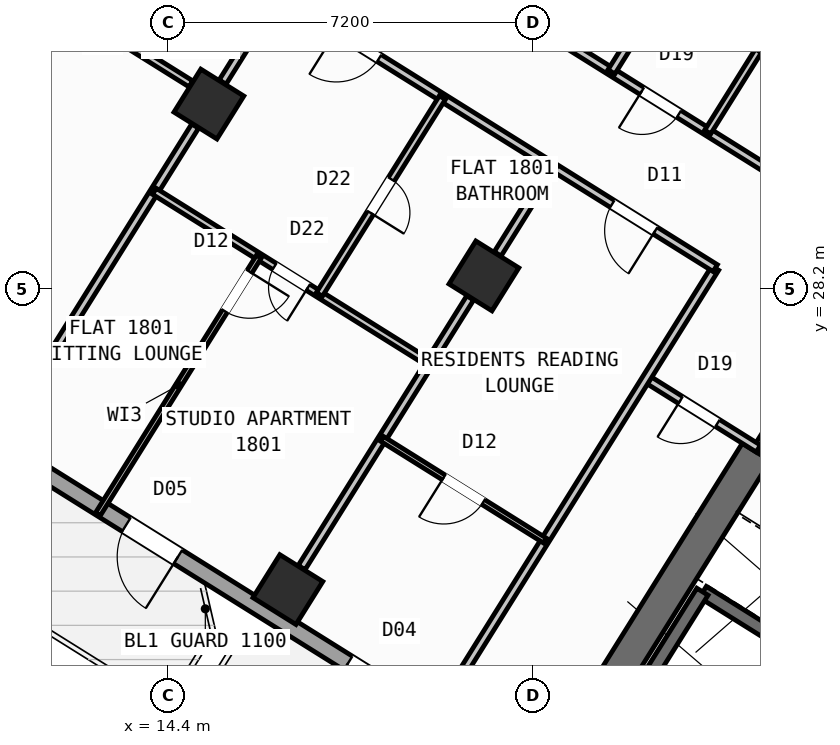
"""IFC4 building model, lengths in metres.
Left out: names, types, materials, properties, quantities, classifications, styles, units other than length and angle.
Written with IfcOpenShell. Run it as: python <this file> out.ifc"""

import sys

from ifc_helpers import new_model, si_unit, direction, frame, frame_2d, origin, origin_2d, place, context, subcontext, project, spatial, rectangle, hollow_rectangle, extrude, source, transform, mapped, element, fill, save


model = new_model("IFC4")
c1 = context("Model", 3, precision=1e-05, world=origin(), true_north=direction((0.0, 1.0)))
c2 = subcontext(c1, "Body", "Model", "MODEL_VIEW")
j1 = project(units=[si_unit("LENGTHUNIT", "METRE"), si_unit("PLANEANGLEUNIT", "RADIAN")], contexts=[c1])
p1 = place(None, origin())
s1 = spatial("IfcSite", under=j1, at=p1, CompositionType="ELEMENT")
p2 = place(p1, origin())
s2 = spatial("IfcBuilding", under=s1, at=p2, CompositionType="ELEMENT")
p3 = place(p2, frame((0.0, 0.0, 71.7)))
s3 = spatial("IfcBuildingStorey", under=s2, at=p3, CompositionType="ELEMENT", Elevation=71.7)
p4 = place(p3, frame((26.007, 24.976, 0.0), z_axis=(0.0, 0.0, 1.0), x_axis=(-0.529916319127, -0.848049936456, 0.0)))
e1 = element("IfcWall", 1, at=p4, inside=s3, PredefinedType="SHEAR", context=c2, shape_type="SweptSolid", body=[
    extrude(rectangle(XDim=6.375, YDim=0.65, at=frame_2d((3.188, 0.0))), origin(), (0.0, 0.0, 1.0), 4.52),
])
m1 = source(origin(), c2, "Body", "SweptSolid", [
    extrude(hollow_rectangle(XDim=1.0, YDim=1.0, WallThickness=0.04, at=origin_2d()), origin(), (0.0, 0.0, 1.0), 4.8),
])
for number, where, z_axis, x_axis in (
    (2, (20.632, 28.452, 0.0), (0.0, 0.0, 1.0), (-0.848, 0.53, 0.0)),
    (3, (16.764, 22.261, 0.0), (0.0, 0.0, 1.0), (-0.848, 0.53, 0.0)),
    (4, (15.205, 31.844, 0.0), (0.0, 0.0, 1.0), (-0.848, 0.53, 0.0)),
):
    element("IfcColumn", number, at=place(p3, frame(where, z_axis=z_axis, x_axis=x_axis)), inside=s3, PredefinedType="COLUMN", context=c2, shape_type="MappedRepresentation", body=[
        mapped(m1, transform((0.0, 0.0, 0.0), scale=1.0)),
    ])
p5 = place(p3, frame((31.76, 12.183, 0.0), z_axis=(0.0, 0.0, 1.0), x_axis=(-0.848047074256, 0.529920899612, 0.0)))
e5 = element("IfcWall", 5, at=p5, inside=s3, PredefinedType="STANDARD", context=c2, shape_type="SweptSolid", body=[
    extrude(rectangle(XDim=30.652, YDim=0.32, at=frame_2d((15.326, 0.0))), origin(), (0.0, 0.0, 1.0), 4.52),
])
p6 = place(p5, frame((20.241, 0.0, 0.0)))
e6 = element("IfcOpeningElement", 6, at=p6, cuts=e5, PredefinedType="OPENING", context=c2, shape_type="SweptSolid", body=[
    extrude(rectangle(XDim=1.2, YDim=2.15, at=frame_2d((0.6, 1.075))), frame((0.0, 0.17, 0.0), z_axis=(0.0, -1.0, 0.0), x_axis=(1.0, 0.0, 0.0)), (0.0, 0.0, 1.0), 0.34),
])
p7 = place(p5, frame((14.781, 0.0, 0.0)))
e7 = element("IfcOpeningElement", 7, at=p7, cuts=e5, PredefinedType="OPENING", context=c2, shape_type="SweptSolid", body=[
    extrude(rectangle(XDim=1.5, YDim=2.25, at=frame_2d((0.75, 1.125))), frame((0.0, 0.17, 0.0), z_axis=(0.0, -1.0, 0.0), x_axis=(1.0, 0.0, 0.0)), (0.0, 0.0, 1.0), 0.34),
])
p8 = place(p5, frame((1.84, 0.0, 0.75)))
e8 = element("IfcOpeningElement", 8, at=p8, cuts=e5, PredefinedType="OPENING", context=c2, shape_type="SweptSolid", body=[
    extrude(rectangle(XDim=2.4, YDim=1.6, at=frame_2d((1.2, 0.8))), frame((0.0, 0.17, 0.0), z_axis=(0.0, -1.0, 0.0), x_axis=(1.0, 0.0, 0.0)), (0.0, 0.0, 1.0), 0.34),
])
p9 = place(p5, frame((7.019, 0.0, 0.75)))
e9 = element("IfcOpeningElement", 9, at=p9, cuts=e5, PredefinedType="OPENING", context=c2, shape_type="SweptSolid", body=[
    extrude(rectangle(XDim=2.4, YDim=1.6, at=frame_2d((1.2, 0.8))), frame((0.0, 0.17, 0.0), z_axis=(0.0, -1.0, 0.0), x_axis=(1.0, 0.0, 0.0)), (0.0, 0.0, 1.0), 0.34),
])
p10 = place(p5, frame((25.841, 0.0, 0.95)))
e10 = element("IfcOpeningElement", 10, at=p10, cuts=e5, PredefinedType="OPENING", context=c2, shape_type="SweptSolid", body=[
    extrude(rectangle(XDim=1.2, YDim=1.4, at=frame_2d((0.6, 0.7))), frame((0.0, 0.17, 0.0), z_axis=(0.0, -1.0, 0.0), x_axis=(1.0, 0.0, 0.0)), (0.0, 0.0, 1.0), 0.34),
])
p11 = place(p3, frame((5.7, 28.71, 0.0), z_axis=(0.0, 0.0, 1.0), x_axis=(0.529923711467, 0.8480453172, 0.0)))
e11 = element("IfcWall", 11, at=p11, inside=s3, PredefinedType="STANDARD", context=c2, shape_type="SweptSolid", body=[
    extrude(rectangle(XDim=21.587, YDim=0.32, at=frame_2d((10.794, 0.0))), origin(), (0.0, 0.0, 1.0), 3.895),
])
p12 = place(p11, frame((2.844, 0.0, 0.75)))
e12 = element("IfcOpeningElement", 12, at=p12, cuts=e11, PredefinedType="OPENING", context=c2, shape_type="SweptSolid", body=[
    extrude(rectangle(XDim=2.4, YDim=1.6, at=frame_2d((1.2, 0.8))), frame((0.0, 0.17, 0.0), z_axis=(0.0, -1.0, 0.0), x_axis=(1.0, 0.0, 0.0)), (0.0, 0.0, 1.0), 0.34),
])
p13 = place(p3, frame((17.424, 47.083, 0.0), z_axis=(0.0, 0.0, 1.0), x_axis=(0.848049927979, -0.529916332693, 0.0)))
e13 = element("IfcWall", 13, at=p13, inside=s3, PredefinedType="STANDARD", context=c2, shape_type="SweptSolid", body=[
    extrude(rectangle(XDim=29.223, YDim=0.32, at=frame_2d((14.612, 0.0))), origin(), (0.0, 0.0, 1.0), 4.52),
])
p14 = place(p13, frame((3.339, 0.0, 0.0)))
e14 = element("IfcOpeningElement", 14, at=p14, cuts=e13, PredefinedType="OPENING", context=c2, shape_type="SweptSolid", body=[
    extrude(rectangle(XDim=1.05, YDim=2.15, at=frame_2d((0.525, 1.075))), frame((0.0, 0.17, 0.0), z_axis=(0.0, -1.0, 0.0), x_axis=(1.0, 0.0, 0.0)), (0.0, 0.0, 1.0), 0.34),
])
p15 = place(p13, frame((8.194, 0.0, 0.75)))
e15 = element("IfcOpeningElement", 15, at=p15, cuts=e13, PredefinedType="OPENING", context=c2, shape_type="SweptSolid", body=[
    extrude(rectangle(XDim=2.4, YDim=1.6, at=frame_2d((1.2, 0.8))), frame((0.0, 0.17, 0.0), z_axis=(0.0, -1.0, 0.0), x_axis=(1.0, 0.0, 0.0)), (0.0, 0.0, 1.0), 0.34),
])
p16 = place(p13, frame((22.226, 0.0, 0.85)))
e16 = element("IfcOpeningElement", 16, at=p16, cuts=e13, PredefinedType="OPENING", context=c2, shape_type="SweptSolid", body=[
    extrude(rectangle(XDim=1.8, YDim=1.5, at=frame_2d((0.9, 0.75))), frame((0.0, 0.17, 0.0), z_axis=(0.0, -1.0, 0.0), x_axis=(1.0, 0.0, 0.0)), (0.0, 0.0, 1.0), 0.34),
])
p17 = place(p13, frame((26.934, 0.0, 0.95)))
e17 = element("IfcOpeningElement", 17, at=p17, cuts=e13, PredefinedType="OPENING", context=c2, shape_type="SweptSolid", body=[
    extrude(rectangle(XDim=1.2, YDim=1.4, at=frame_2d((0.6, 0.7))), frame((0.0, 0.17, 0.0), z_axis=(0.0, -1.0, 0.0), x_axis=(1.0, 0.0, 0.0)), (0.0, 0.0, 1.0), 0.34),
])
p18 = place(p13, frame((14.636, 0.0, 1.0)))
e18 = element("IfcOpeningElement", 18, at=p18, cuts=e13, PredefinedType="OPENING", context=c2, shape_type="SweptSolid", body=[
    extrude(rectangle(XDim=0.9, YDim=1.25, at=frame_2d((0.45, 0.625))), frame((0.0, 0.17, 0.0), z_axis=(0.0, -1.0, 0.0), x_axis=(1.0, 0.0, 0.0)), (0.0, 0.0, 1.0), 0.34),
])
p19 = place(p3, frame((31.28, 18.261, 0.0), z_axis=(0.0, 0.0, 1.0), x_axis=(-0.848051618787, 0.529913626805, 0.0)))
e19 = element("IfcWall", 19, at=p19, inside=s3, PredefinedType="SHEAR", context=c2, shape_type="SweptSolid", body=[
    extrude(rectangle(XDim=7.46, YDim=0.26, at=frame_2d((3.73, 0.0))), origin(), (0.0, 0.0, 1.0), 4.52),
])
p20 = place(p19, frame((0.36, 0.0, 0.0)))
e20 = element("IfcOpeningElement", 20, at=p20, cuts=e19, PredefinedType="OPENING", context=c2, shape_type="SweptSolid", body=[
    extrude(rectangle(XDim=0.86, YDim=2.05, at=frame_2d((0.43, 1.025))), frame((0.0, 0.14, 0.0), z_axis=(0.0, -1.0, 0.0), x_axis=(1.0, 0.0, 0.0)), (0.0, 0.0, 1.0), 0.28),
])
p21 = place(p3, frame((24.945, 22.22, 0.0), z_axis=(0.0, 0.0, 1.0), x_axis=(-0.529908658664, -0.84805472316, 0.0)))
e21 = element("IfcWall", 21, at=p21, inside=s3, PredefinedType="SHEAR", context=c2, shape_type="SweptSolid", body=[
    extrude(rectangle(XDim=3.16, YDim=0.26, at=frame_2d((1.58, 0.0))), origin(), (0.0, 0.0, 1.0), 4.52),
])
p22 = place(p3, frame((27.596, 27.52, 0.0), z_axis=(0.0, 0.0, 1.0), x_axis=(-0.529865479138, -0.848081702443, 0.0)))
e22 = element("IfcWall", 22, at=p22, inside=s3, PredefinedType="STANDARD", context=c2, shape_type="SweptSolid", body=[
    extrude(rectangle(XDim=2.96, YDim=0.2, at=frame_2d((1.48, 0.0))), origin(), (0.0, 0.0, 1.0), 4.51),
])
p23 = place(p22, frame((1.76, 0.0, 0.0)))
e23 = element("IfcOpeningElement", 23, at=p23, cuts=e22, PredefinedType="OPENING", context=c2, shape_type="SweptSolid", body=[
    extrude(rectangle(XDim=0.86, YDim=2.05, at=frame_2d((0.43, 1.025))), frame((0.0, 0.11, 0.0), z_axis=(0.0, -1.0, 0.0), x_axis=(1.0, 0.0, 0.0)), (0.0, 0.0, 1.0), 0.22),
])
p24 = place(p3, frame((26.049, 25.044, 0.0), z_axis=(0.0, 0.0, 1.0), x_axis=(-0.848050851465, 0.529914854792, 0.0)))
e24 = element("IfcWall", 24, at=p24, inside=s3, PredefinedType="PARTITIONING", context=c2, shape_type="SweptSolid", body=[
    extrude(rectangle(XDim=2.61, YDim=0.16, at=frame_2d((1.305, 0.0))), origin(), (0.0, 0.0, 1.0), 3.895),
])
p25 = place(p24, frame((0.95, 0.0, 0.0)))
e25 = element("IfcOpeningElement", 25, at=p25, cuts=e24, PredefinedType="OPENING", context=c2, shape_type="SweptSolid", body=[
    extrude(rectangle(XDim=0.86, YDim=2.05, at=frame_2d((0.43, 1.025))), frame((0.0, 0.09, 0.0), z_axis=(0.0, -1.0, 0.0), x_axis=(1.0, 0.0, 0.0)), (0.0, 0.0, 1.0), 0.18),
])
p26 = place(p3, frame((25.198, 28.606, 0.0), z_axis=(0.0, 0.0, 1.0), x_axis=(-0.529926497642, -0.848043576178, 0.0)))
e26 = element("IfcWall", 26, at=p26, inside=s3, PredefinedType="PARTITIONING", context=c2, shape_type="SweptSolid", body=[
    extrude(rectangle(XDim=10.3, YDim=0.16, at=frame_2d((5.15, 0.0))), origin(), (0.0, 0.0, 1.0), 4.51),
])
p27 = place(p3, frame((26.363, 30.472, 0.0), z_axis=(0.0, 0.0, 1.0), x_axis=(-0.848052408131, 0.529912363569, 0.0)))
e27 = element("IfcWall", 27, at=p27, inside=s3, PredefinedType="PARTITIONING", context=c2, shape_type="SweptSolid", body=[
    extrude(rectangle(XDim=16.73, YDim=0.16, at=frame_2d((8.365, 0.0))), origin(), (0.0, 0.0, 1.0), 4.51),
])
p28 = place(p27, frame((2.22, 0.0, 0.0)))
e28 = element("IfcOpeningElement", 28, at=p28, cuts=e27, PredefinedType="OPENING", context=c2, shape_type="SweptSolid", body=[
    extrude(rectangle(XDim=0.86, YDim=2.05, at=frame_2d((0.43, 1.025))), frame((0.0, 0.09, 0.0), z_axis=(0.0, -1.0, 0.0), x_axis=(1.0, 0.0, 0.0)), (0.0, 0.0, 1.0), 0.18),
])
p29 = place(p27, frame((7.82, 0.0, 0.0)))
e29 = element("IfcOpeningElement", 29, at=p29, cuts=e27, PredefinedType="OPENING", context=c2, shape_type="SweptSolid", body=[
    extrude(rectangle(XDim=1.0, YDim=2.1, at=frame_2d((0.5, 1.05))), frame((0.0, 0.09, 0.0), z_axis=(0.0, -1.0, 0.0), x_axis=(1.0, 0.0, 0.0)), (0.0, 0.0, 1.0), 0.18),
])
p30 = place(p27, frame((12.95, 0.0, 0.0)))
e30 = element("IfcOpeningElement", 30, at=p30, cuts=e27, PredefinedType="OPENING", context=c2, shape_type="SweptSolid", body=[
    extrude(rectangle(XDim=1.0, YDim=2.1, at=frame_2d((0.5, 1.05))), frame((0.0, 0.09, 0.0), z_axis=(0.0, -1.0, 0.0), x_axis=(1.0, 0.0, 0.0)), (0.0, 0.0, 1.0), 0.18),
])
p31 = place(p3, frame((25.198, 28.606, 0.0), z_axis=(0.0, 0.0, 1.0), x_axis=(-0.848052408131, 0.529912363569, 0.0)))
e31 = element("IfcWall", 31, at=p31, inside=s3, PredefinedType="PARTITIONING", context=c2, shape_type="SweptSolid", body=[
    extrude(rectangle(XDim=16.73, YDim=0.16, at=frame_2d((8.365, 0.0))), origin(), (0.0, 0.0, 1.0), 4.51),
])
p32 = place(p31, frame((1.395, 0.0, 0.0)))
e32 = element("IfcOpeningElement", 32, at=p32, cuts=e31, PredefinedType="OPENING", context=c2, shape_type="SweptSolid", body=[
    extrude(rectangle(XDim=1.0, YDim=2.1, at=frame_2d((0.5, 1.05))), frame((0.0, 0.09, 0.0), z_axis=(0.0, -1.0, 0.0), x_axis=(1.0, 0.0, 0.0)), (0.0, 0.0, 1.0), 0.18),
])
p33 = place(p31, frame((7.82, 0.0, 0.0)))
e33 = element("IfcOpeningElement", 33, at=p33, cuts=e31, PredefinedType="OPENING", context=c2, shape_type="SweptSolid", body=[
    extrude(rectangle(XDim=1.0, YDim=2.1, at=frame_2d((0.5, 1.05))), frame((0.0, 0.09, 0.0), z_axis=(0.0, -1.0, 0.0), x_axis=(1.0, 0.0, 0.0)), (0.0, 0.0, 1.0), 0.18),
])
p34 = place(p31, frame((14.76, 0.0, 0.0)))
e34 = element("IfcOpeningElement", 34, at=p34, cuts=e31, PredefinedType="OPENING", context=c2, shape_type="SweptSolid", body=[
    extrude(rectangle(XDim=1.0, YDim=2.1, at=frame_2d((0.5, 1.05))), frame((0.0, 0.09, 0.0), z_axis=(0.0, -1.0, 0.0), x_axis=(1.0, 0.0, 0.0)), (0.0, 0.0, 1.0), 0.18),
])
p35 = place(p3, frame((21.983, 30.615, 0.0), z_axis=(0.0, 0.0, 1.0), x_axis=(-0.529966635742, -0.848018493313, 0.0)))
e35 = element("IfcWall", 35, at=p35, inside=s3, PredefinedType="PARTITIONING", context=c2, shape_type="SweptSolid", body=[
    extrude(rectangle(XDim=2.038, YDim=0.16, at=frame_2d((1.019, 0.0))), origin(), (0.0, 0.0, 1.0), 3.895),
])
p36 = place(p3, frame((20.361, 28.018, 0.0), z_axis=(0.0, 0.0, 1.0), x_axis=(-0.529915015264, -0.848050751193, 0.0)))
e36 = element("IfcWall", 36, at=p36, inside=s3, PredefinedType="PARTITIONING", context=c2, shape_type="SweptSolid", body=[
    extrude(rectangle(XDim=6.276, YDim=0.16, at=frame_2d((3.138, 0.0))), origin(), (0.0, 0.0, 1.0), 3.895),
])
p37 = place(p3, frame((21.837, 23.228, 0.0), z_axis=(0.0, 0.0, 1.0), x_axis=(-0.84803087207, 0.529946827537, 0.0)))
e37 = element("IfcWall", 37, at=p37, inside=s3, PredefinedType="PARTITIONING", context=c2, shape_type="SweptSolid", body=[
    extrude(rectangle(XDim=3.79, YDim=0.11, at=frame_2d((1.895, 0.0))), origin(), (0.0, 0.0, 1.0), 4.51),
])
p38 = place(p37, frame((1.435, 0.0, 0.0)))
e38 = element("IfcOpeningElement", 38, at=p38, cuts=e37, PredefinedType="OPENING", context=c2, shape_type="SweptSolid", body=[
    extrude(rectangle(XDim=0.92, YDim=2.08, at=frame_2d((0.46, 1.04))), frame((0.0, 0.065, 0.0), z_axis=(0.0, -1.0, 0.0), x_axis=(1.0, 0.0, 0.0)), (0.0, 0.0, 1.0), 0.13),
])
p39 = place(p3, frame((16.556, 34.006, 0.0), z_axis=(0.0, 0.0, 1.0), x_axis=(-0.529966635742, -0.848018493313, 0.0)))
e39 = element("IfcWall", 39, at=p39, inside=s3, PredefinedType="PARTITIONING", context=c2, shape_type="SweptSolid", body=[
    extrude(rectangle(XDim=2.038, YDim=0.16, at=frame_2d((1.019, 0.0))), origin(), (0.0, 0.0, 1.0), 3.895),
])
p40 = place(p3, frame((14.933, 31.409, 0.0), z_axis=(0.0, 0.0, 1.0), x_axis=(-0.529897533635, -0.848061674554, 0.0)))
e40 = element("IfcWall", 40, at=p40, inside=s3, PredefinedType="PARTITIONING", context=c2, shape_type="SweptSolid", body=[
    extrude(rectangle(XDim=6.276, YDim=0.16, at=frame_2d((3.138, 0.0))), origin(), (0.0, 0.0, 1.0), 3.895),
])
p41 = place(p3, frame((19.556, 26.73, 0.0), z_axis=(0.0, 0.0, 1.0), x_axis=(-0.848049732085, 0.529916646191, 0.0)))
e41 = element("IfcWall", 41, at=p41, inside=s3, PredefinedType="PLUMBINGWALL", context=c2, shape_type="SweptSolid", body=[
    extrude(rectangle(XDim=6.4, YDim=0.14, at=frame_2d((3.2, 0.0))), origin(), (0.0, 0.0, 1.0), 4.51),
])
p42 = place(p41, frame((2.824, 0.0, 0.0)))
e42 = element("IfcOpeningElement", 42, at=p42, cuts=e41, PredefinedType="OPENING", context=c2, shape_type="SweptSolid", body=[
    extrude(rectangle(XDim=0.78, YDim=2.05, at=frame_2d((0.39, 1.025))), frame((0.0, 0.08, 0.0), z_axis=(0.0, -1.0, 0.0), x_axis=(1.0, 0.0, 0.0)), (0.0, 0.0, 1.0), 0.16),
])
p43 = place(p3, frame((19.812, 31.971, 0.0), z_axis=(0.0, 0.0, 1.0), x_axis=(-0.529917480809, -0.848049210561, 0.0)))
e43 = element("IfcWall", 43, at=p43, inside=s3, PredefinedType="PLUMBINGWALL", context=c2, shape_type="SweptSolid", body=[
    extrude(rectangle(XDim=4.58, YDim=0.14, at=frame_2d((2.29, 0.0))), origin(), (0.0, 0.0, 1.0), 4.51),
])
p44 = place(p43, frame((1.9, 0.0, 0.0)))
e44 = element("IfcOpeningElement", 44, at=p44, cuts=e43, PredefinedType="OPENING", context=c2, shape_type="SweptSolid", body=[
    extrude(rectangle(XDim=0.78, YDim=2.05, at=frame_2d((0.39, 1.025))), frame((0.0, 0.08, 0.0), z_axis=(0.0, -1.0, 0.0), x_axis=(1.0, 0.0, 0.0)), (0.0, 0.0, 1.0), 0.16),
])
p45 = place(p3, frame((16.191, 28.833, 0.0), z_axis=(0.0, 0.0, 1.0), x_axis=(-0.529900017123, -0.848060122782, 0.0)))
e45 = element("IfcWall", 45, at=p45, inside=s3, PredefinedType="PARTITIONING", context=c2, shape_type="SweptSolid", body=[
    extrude(rectangle(XDim=5.99, YDim=0.11, at=frame_2d((2.995, 0.0))), origin(), (0.0, 0.0, 1.0), 4.51),
])
p46 = place(p45, frame((0.35, 0.0, 0.0)))
e46 = element("IfcOpeningElement", 46, at=p46, cuts=e45, PredefinedType="OPENING", context=c2, shape_type="SweptSolid", body=[
    extrude(rectangle(XDim=0.92, YDim=2.08, at=frame_2d((0.46, 1.04))), frame((0.0, 0.065, 0.0), z_axis=(0.0, -1.0, 0.0), x_axis=(1.0, 0.0, 0.0)), (0.0, 0.0, 1.0), 0.13),
])
p47 = place(p3, frame((13.486, 35.924, 0.0), z_axis=(0.0, 0.0, 1.0), x_axis=(-0.529924195719, -0.848045014602, 0.0)))
e47 = element("IfcWall", 47, at=p47, inside=s3, PredefinedType="PARTITIONING", context=c2, shape_type="SweptSolid", body=[
    extrude(rectangle(XDim=10.57, YDim=0.11, at=frame_2d((5.285, 0.0))), origin(), (0.0, 0.0, 1.0), 4.51),
])
p48 = place(p47, frame((0.76, 0.0, 0.0)))
e48 = element("IfcOpeningElement", 48, at=p48, cuts=e47, PredefinedType="OPENING", context=c2, shape_type="SweptSolid", body=[
    extrude(rectangle(XDim=0.78, YDim=2.05, at=frame_2d((0.39, 1.025))), frame((0.0, 0.065, 0.0), z_axis=(0.0, -1.0, 0.0), x_axis=(1.0, 0.0, 0.0)), (0.0, 0.0, 1.0), 0.13),
])
p49 = place(p47, frame((6.025, 0.0, 0.0)))
e49 = element("IfcOpeningElement", 49, at=p49, cuts=e47, PredefinedType="OPENING", context=c2, shape_type="SweptSolid", body=[
    extrude(rectangle(XDim=0.92, YDim=2.08, at=frame_2d((0.46, 1.04))), frame((0.0, 0.065, 0.0), z_axis=(0.0, -1.0, 0.0), x_axis=(1.0, 0.0, 0.0)), (0.0, 0.0, 1.0), 0.13),
])
p50 = place(p3, frame((14.85, 32.242, 0.0), z_axis=(0.0, 0.0, 1.0), x_axis=(-0.848051256418, 0.529914206724, 0.0)))
e50 = element("IfcWall", 50, at=p50, inside=s3, PredefinedType="PLUMBINGWALL", context=c2, shape_type="SweptSolid", body=[
    extrude(rectangle(XDim=3.108, YDim=0.14, at=frame_2d((1.554, 0.0))), origin(), (0.0, 0.0, 1.0), 3.895),
])
p51 = place(p3, frame((24.229, 34.209, 0.0), z_axis=(0.0, 0.0, 1.0), x_axis=(-0.529826648289, -0.84810596199, 0.0)))
e51 = element("IfcWall", 51, at=p51, inside=s3, PredefinedType="PARTITIONING", context=c2, shape_type="SweptSolid", body=[
    extrude(rectangle(XDim=2.038, YDim=0.16, at=frame_2d((1.019, 0.0))), origin(), (0.0, 0.0, 1.0), 3.895),
])
p52 = place(p3, frame((27.439, 35.118, 0.0), z_axis=(0.0, 0.0, 1.0), x_axis=(-0.529911350634, -0.84805304107, 0.0)))
e52 = element("IfcWall", 52, at=p52, inside=s3, PredefinedType="PLUMBINGWALL", context=c2, shape_type="SweptSolid", body=[
    extrude(rectangle(XDim=4.51, YDim=0.14, at=frame_2d((2.255, 0.0))), origin(), (0.0, 0.0, 1.0), 4.135),
])
p53 = place(p52, frame((1.865, 0.0, 0.0)))
e53 = element("IfcOpeningElement", 53, at=p53, cuts=e52, PredefinedType="OPENING", context=c2, shape_type="SweptSolid", body=[
    extrude(rectangle(XDim=0.78, YDim=2.05, at=frame_2d((0.39, 1.025))), frame((0.0, 0.08, 0.0), z_axis=(0.0, -1.0, 0.0), x_axis=(1.0, 0.0, 0.0)), (0.0, 0.0, 1.0), 0.16),
])
m2 = source(origin(), c2, "Body", "SweptSolid", [
    extrude(rectangle(XDim=1.2, YDim=2.15, at=frame_2d((0.6, 1.075))), frame((0.0, 0.025, 0.0), z_axis=(0.0, -1.0, 0.0), x_axis=(1.0, 0.0, 0.0)), (0.0, 0.0, 1.0), 0.05),
])
p54 = place(p6, origin())
e54 = element("IfcDoor", 54, at=p54, inside=s3, OperationType="SINGLE_SWING_LEFT", PredefinedType="DOOR", context=c2, shape_type="MappedRepresentation", body=[
    mapped(m2, transform((0.0, 0.0, 0.0), scale=1.0)),
])
fill(e6, e54)
m3 = source(origin(), c2, "Body", "SweptSolid", [
    extrude(rectangle(XDim=1.5, YDim=2.25, at=frame_2d((0.75, 1.125))), frame((0.0, 0.025, 0.0), z_axis=(0.0, -1.0, 0.0), x_axis=(1.0, 0.0, 0.0)), (0.0, 0.0, 1.0), 0.05),
])
p55 = place(p7, origin())
e55 = element("IfcDoor", 55, at=p55, inside=s3, OperationType="DOUBLE_DOOR_SINGLE_SWING", PredefinedType="DOOR", context=c2, shape_type="MappedRepresentation", body=[
    mapped(m3, transform((0.0, 0.0, 0.0), scale=1.0)),
])
fill(e7, e55)
m4 = source(origin(), c2, "Body", "SweptSolid", [
    extrude(rectangle(XDim=0.86, YDim=2.05, at=frame_2d((0.43, 1.025))), frame((0.0, 0.025, 0.0), z_axis=(0.0, -1.0, 0.0), x_axis=(1.0, 0.0, 0.0)), (0.0, 0.0, 1.0), 0.05),
])
p56 = place(p25, origin())
e56 = element("IfcDoor", 56, at=p56, inside=s3, OperationType="SINGLE_SWING_RIGHT", PredefinedType="DOOR", context=c2, shape_type="MappedRepresentation", body=[
    mapped(m4, transform((0.0, 0.0, 0.0), scale=1.0)),
])
fill(e25, e56)
m5 = source(origin(), c2, "Body", "SweptSolid", [
    extrude(rectangle(XDim=1.0, YDim=2.1, at=frame_2d((0.5, 1.05))), frame((0.0, 0.025, 0.0), z_axis=(0.0, -1.0, 0.0), x_axis=(1.0, 0.0, 0.0)), (0.0, 0.0, 1.0), 0.05),
])
p57 = place(p32, origin())
e57 = element("IfcDoor", 57, at=p57, inside=s3, OperationType="SINGLE_SWING_LEFT", PredefinedType="DOOR", context=c2, shape_type="MappedRepresentation", body=[
    mapped(m5, transform((0.0, 0.0, 0.0), scale=1.0)),
])
fill(e32, e57)
m6 = source(origin(), c2, "Body", "SweptSolid", [
    extrude(rectangle(XDim=0.92, YDim=2.08, at=frame_2d((0.46, 1.04))), frame((0.0, 0.025, 0.0), z_axis=(0.0, -1.0, 0.0), x_axis=(1.0, 0.0, 0.0)), (0.0, 0.0, 1.0), 0.05),
])
p58 = place(p38, origin())
e58 = element("IfcDoor", 58, at=p58, inside=s3, OperationType="SINGLE_SWING_RIGHT", PredefinedType="DOOR", context=c2, shape_type="MappedRepresentation", body=[
    mapped(m6, transform((0.0, 0.0, 0.0), scale=1.0)),
])
fill(e38, e58)
p59 = place(p46, origin())
e59 = element("IfcDoor", 59, at=p59, inside=s3, OperationType="SINGLE_SWING_LEFT", PredefinedType="DOOR", context=c2, shape_type="MappedRepresentation", body=[
    mapped(m6, transform((0.0, 0.0, 0.0), scale=1.0)),
])
fill(e46, e59)
p60 = place(p33, origin())
e60 = element("IfcDoor", 60, at=p60, inside=s3, OperationType="SINGLE_SWING_RIGHT", PredefinedType="DOOR", context=c2, shape_type="MappedRepresentation", body=[
    mapped(m5, transform((0.0, 0.0, 0.0), scale=1.0)),
])
fill(e33, e60)
m7 = source(origin(), c2, "Body", "SweptSolid", [
    extrude(rectangle(XDim=0.78, YDim=2.05, at=frame_2d((0.39, 1.025))), frame((0.0, 0.025, 0.0), z_axis=(0.0, -1.0, 0.0), x_axis=(1.0, 0.0, 0.0)), (0.0, 0.0, 1.0), 0.05),
])
p61 = place(p42, origin())
e61 = element("IfcDoor", 61, at=p61, inside=s3, OperationType="SINGLE_SWING_LEFT", PredefinedType="DOOR", context=c2, shape_type="MappedRepresentation", body=[
    mapped(m7, transform((0.0, 0.0, 0.0), scale=1.0)),
])
fill(e42, e61)
p62 = place(p44, origin())
e62 = element("IfcDoor", 62, at=p62, inside=s3, OperationType="SINGLE_SWING_RIGHT", PredefinedType="DOOR", context=c2, shape_type="MappedRepresentation", body=[
    mapped(m7, transform((0.0, 0.0, 0.0), scale=1.0)),
])
fill(e44, e62)
p63 = place(p28, origin())
e63 = element("IfcDoor", 63, at=p63, inside=s3, OperationType="SINGLE_SWING_RIGHT", PredefinedType="DOOR", context=c2, shape_type="MappedRepresentation", body=[
    mapped(m4, transform((0.0, 0.0, 0.0), scale=1.0)),
])
fill(e28, e63)
p64 = place(p53, origin())
e64 = element("IfcDoor", 64, at=p64, inside=s3, OperationType="SINGLE_SWING_RIGHT", PredefinedType="DOOR", context=c2, shape_type="MappedRepresentation", body=[
    mapped(m7, transform((0.0, 0.0, 0.0), scale=1.0)),
])
fill(e53, e64)
save(model, sys.argv[1])
